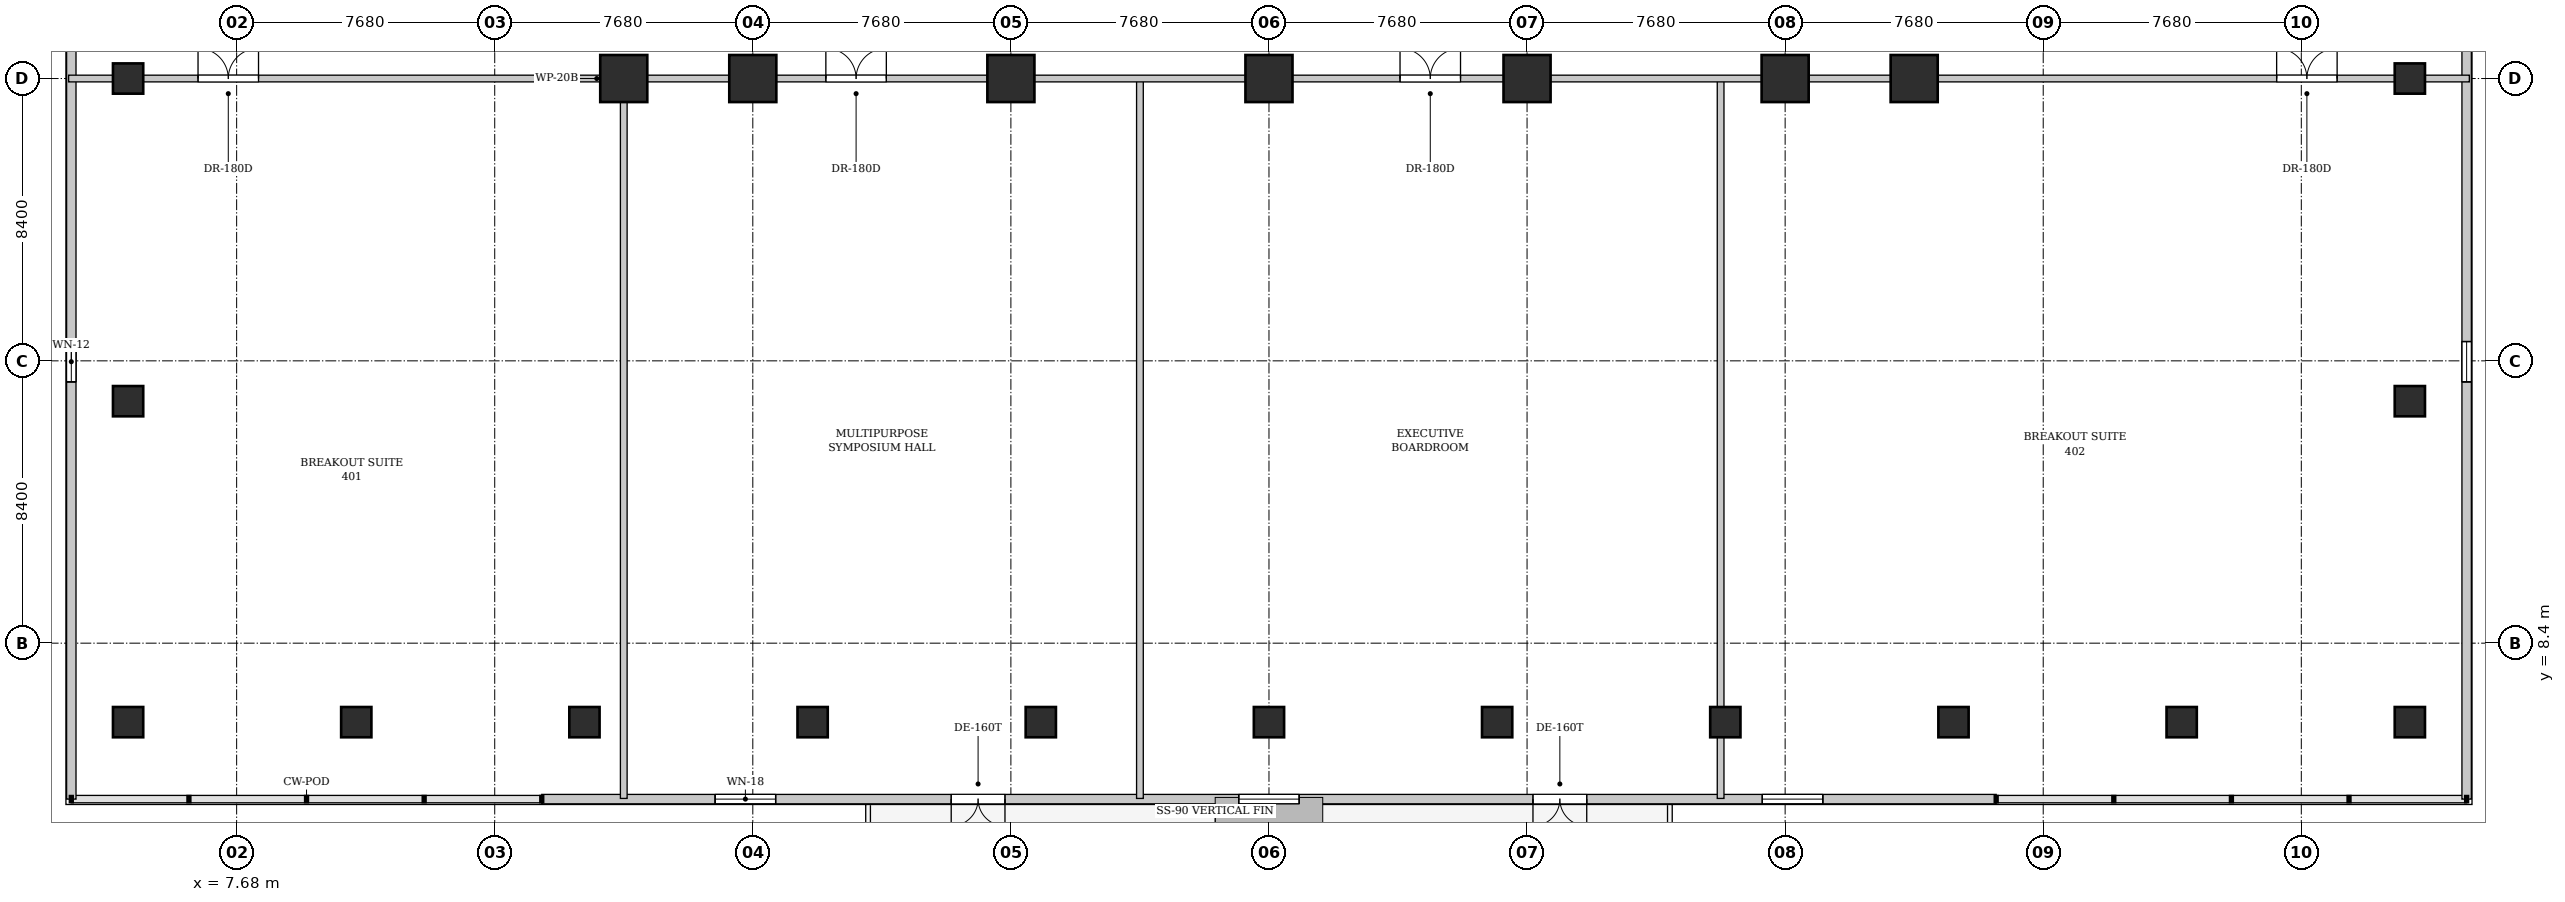
"""IFC4 building model, lengths in metres.
Left out: names, types, materials, properties, quantities, classifications, styles, units other than length and angle.
Written with IfcOpenShell. Run it as: python <this file> out.ifc"""

import sys

from ifc_helpers import new_model, si_unit, direction, frame, frame_2d, origin, origin_2d, place, context, subcontext, project, spatial, rectangle, extrude, element, fill, save


model = new_model("IFC4")
c1 = context("Model", 3, precision=1e-05, world=origin(), true_north=direction((0.0, 1.0)))
c2 = subcontext(c1, "Body", "Model", "MODEL_VIEW")
j1 = project(units=[si_unit("LENGTHUNIT", "METRE"), si_unit("PLANEANGLEUNIT", "RADIAN")], contexts=[c1])
p1 = place(None, origin())
s1 = spatial("IfcSite", under=j1, at=p1, CompositionType="ELEMENT")
p2 = place(p1, origin())
s2 = spatial("IfcBuilding", under=s1, at=p2, CompositionType="ELEMENT")
p3 = place(p2, frame((0.0, 0.0, 20.4)))
s3 = spatial("IfcBuildingStorey", under=s2, at=p3, CompositionType="ELEMENT", Elevation=20.4)
for number, where, z_axis, x_axis in (
    (1, (23.04, 25.2, 0.0), (0.0, 0.0, 1.0), (1.0, 0.0, 0.0)),
    (2, (30.72, 25.2, 0.0), (0.0, 0.0, 1.0), (1.0, 0.0, 0.0)),
    (3, (38.4, 25.2, 0.0), (0.0, 0.0, 1.0), (1.0, 0.0, 0.0)),
    (4, (46.08, 25.2, 0.0), (0.0, 0.0, 1.0), (1.0, 0.0, 0.0)),
    (5, (53.76, 25.2, 0.0), (0.0, 0.0, 1.0), (1.0, 0.0, 0.0)),
    (6, (19.2, 25.2, 0.0), (0.0, 0.0, 1.0), (1.0, 0.0, 0.0)),
    (7, (57.6, 25.2, 0.0), (0.0, 0.0, 1.0), (1.0, 0.0, 0.0)),
):
    element("IfcColumn", number, at=place(p3, frame(where, z_axis=z_axis, x_axis=x_axis)), inside=s3, PredefinedType="COLUMN", context=c2, shape_type="SweptSolid", body=[
        extrude(rectangle(XDim=1.4, YDim=1.4, at=origin_2d()), origin(), (0.0, 0.0, 1.0), 4.8),
    ])
for number, where, z_axis, x_axis in (
    (8, (4.45, 6.05, 0.0), (0.0, 0.0, 1.0), (1.0, 0.0, 0.0)),
    (9, (11.24, 6.05, 0.0), (0.0, 0.0, 1.0), (1.0, 0.0, 0.0)),
    (10, (18.03, 6.05, 0.0), (0.0, 0.0, 1.0), (1.0, 0.0, 0.0)),
    (11, (24.82, 6.05, 0.0), (0.0, 0.0, 1.0), (1.0, 0.0, 0.0)),
    (12, (31.61, 6.05, 0.0), (0.0, 0.0, 1.0), (1.0, 0.0, 0.0)),
    (13, (38.4, 6.05, 0.0), (0.0, 0.0, 1.0), (1.0, 0.0, 0.0)),
    (14, (45.19, 6.05, 0.0), (0.0, 0.0, 1.0), (1.0, 0.0, 0.0)),
    (15, (51.98, 6.05, 0.0), (0.0, 0.0, 1.0), (1.0, 0.0, 0.0)),
    (16, (58.77, 6.05, 0.0), (0.0, 0.0, 1.0), (1.0, 0.0, 0.0)),
    (17, (65.56, 6.05, 0.0), (0.0, 0.0, 1.0), (1.0, 0.0, 0.0)),
    (18, (72.35, 6.05, 0.0), (0.0, 0.0, 1.0), (1.0, 0.0, 0.0)),
    (19, (4.45, 15.6, 0.0), (0.0, 0.0, 1.0), (1.0, 0.0, 0.0)),
    (20, (72.35, 15.6, 0.0), (0.0, 0.0, 1.0), (1.0, 0.0, 0.0)),
    (21, (4.45, 25.2, 0.0), (0.0, 0.0, 1.0), (1.0, 0.0, 0.0)),
    (22, (72.35, 25.2, 0.0), (0.0, 0.0, 1.0), (1.0, 0.0, 0.0)),
):
    element("IfcColumn", number, at=place(p3, frame(where, z_axis=z_axis, x_axis=x_axis)), inside=s3, PredefinedType="COLUMN", context=c2, shape_type="SweptSolid", body=[
        extrude(rectangle(XDim=0.9, YDim=0.9, at=origin_2d()), origin(), (0.0, 0.0, 1.0), 4.8),
    ])
p4 = place(p3, frame((2.76, 3.76, 0.0), z_axis=(0.0, 0.0, 1.0), x_axis=(0.0, 1.0, 0.0)))
e23 = element("IfcWall", 23, at=p4, inside=s3, PredefinedType="SOLIDWALL", context=c2, shape_type="SweptSolid", body=[
    extrude(rectangle(XDim=46.48, YDim=0.28, at=frame_2d((23.24, 0.0))), origin(), (0.0, 0.0, 1.0), 4.38),
])
p5 = place(p4, frame((12.414, 0.0, 1.0)))
e24 = element("IfcOpeningElement", 24, at=p5, cuts=e23, PredefinedType="OPENING", context=c2, shape_type="SweptSolid", body=[
    extrude(rectangle(XDim=1.2, YDim=1.8, at=frame_2d((0.6, 0.9))), frame((0.0, 0.15, 0.0), z_axis=(0.0, -1.0, 0.0), x_axis=(1.0, 0.0, 0.0)), (0.0, 0.0, 1.0), 0.3),
])
p6 = place(p4, frame((32.865, 0.0, 1.0)))
e25 = element("IfcOpeningElement", 25, at=p6, cuts=e23, PredefinedType="OPENING", context=c2, shape_type="SweptSolid", body=[
    extrude(rectangle(XDim=1.2, YDim=1.8, at=frame_2d((0.6, 0.9))), frame((0.0, 0.15, 0.0), z_axis=(0.0, -1.0, 0.0), x_axis=(1.0, 0.0, 0.0)), (0.0, 0.0, 1.0), 0.3),
])
p7 = place(p3, frame((74.04, 50.24, 0.0), z_axis=(0.0, 0.0, 1.0), x_axis=(0.0, -1.0, 0.0)))
e26 = element("IfcWall", 26, at=p7, inside=s3, PredefinedType="SOLIDWALL", context=c2, shape_type="SweptSolid", body=[
    extrude(rectangle(XDim=46.48, YDim=0.28, at=frame_2d((23.24, 0.0))), origin(), (0.0, 0.0, 1.0), 4.38),
])
p8 = place(p7, frame((12.414, 0.0, 1.0)))
e27 = element("IfcOpeningElement", 27, at=p8, cuts=e26, PredefinedType="OPENING", context=c2, shape_type="SweptSolid", body=[
    extrude(rectangle(XDim=1.2, YDim=1.8, at=frame_2d((0.6, 0.9))), frame((0.0, 0.15, 0.0), z_axis=(0.0, -1.0, 0.0), x_axis=(1.0, 0.0, 0.0)), (0.0, 0.0, 1.0), 0.3),
])
p9 = place(p7, frame((32.865, 0.0, 1.0)))
e28 = element("IfcOpeningElement", 28, at=p9, cuts=e26, PredefinedType="OPENING", context=c2, shape_type="SweptSolid", body=[
    extrude(rectangle(XDim=1.2, YDim=1.8, at=frame_2d((0.6, 0.9))), frame((0.0, 0.15, 0.0), z_axis=(0.0, -1.0, 0.0), x_axis=(1.0, 0.0, 0.0)), (0.0, 0.0, 1.0), 0.3),
])
p10 = place(p3, frame((16.76, 3.76, 0.0), z_axis=(0.0, 0.0, 1.0), x_axis=(1.0, 0.0, 0.0)))
e29 = element("IfcWall", 29, at=p10, inside=s3, PredefinedType="SOLIDWALL", context=c2, shape_type="SweptSolid", body=[
    extrude(rectangle(XDim=43.28, YDim=0.28, at=frame_2d((21.64, 0.0))), origin(), (0.0, 0.0, 1.0), 4.38),
])
p11 = place(p10, frame((12.184, 0.0, 0.0)))
e30 = element("IfcOpeningElement", 30, at=p11, cuts=e29, PredefinedType="OPENING", context=c2, shape_type="SweptSolid", body=[
    extrude(rectangle(XDim=1.6, YDim=2.25, at=frame_2d((0.8, 1.125))), frame((0.0, 0.15, 0.0), z_axis=(0.0, -1.0, 0.0), x_axis=(1.0, 0.0, 0.0)), (0.0, 0.0, 1.0), 0.3),
])
p12 = place(p10, frame((29.496, 0.0, 0.0)))
e31 = element("IfcOpeningElement", 31, at=p12, cuts=e29, PredefinedType="OPENING", context=c2, shape_type="SweptSolid", body=[
    extrude(rectangle(XDim=1.6, YDim=2.25, at=frame_2d((0.8, 1.125))), frame((0.0, 0.15, 0.0), z_axis=(0.0, -1.0, 0.0), x_axis=(1.0, 0.0, 0.0)), (0.0, 0.0, 1.0), 0.3),
])
p13 = place(p10, frame((5.159, 0.0, 0.9)))
e32 = element("IfcOpeningElement", 32, at=p13, cuts=e29, PredefinedType="OPENING", context=c2, shape_type="SweptSolid", body=[
    extrude(rectangle(XDim=1.8, YDim=2.0, at=frame_2d((0.9, 1.0))), frame((0.0, 0.15, 0.0), z_axis=(0.0, -1.0, 0.0), x_axis=(1.0, 0.0, 0.0)), (0.0, 0.0, 1.0), 0.3),
])
p14 = place(p10, frame((20.74, 0.0, 0.9)))
e33 = element("IfcOpeningElement", 33, at=p14, cuts=e29, PredefinedType="OPENING", context=c2, shape_type="SweptSolid", body=[
    extrude(rectangle(XDim=1.8, YDim=2.0, at=frame_2d((0.9, 1.0))), frame((0.0, 0.15, 0.0), z_axis=(0.0, -1.0, 0.0), x_axis=(1.0, 0.0, 0.0)), (0.0, 0.0, 1.0), 0.3),
])
p15 = place(p10, frame((36.321, 0.0, 0.9)))
e34 = element("IfcOpeningElement", 34, at=p15, cuts=e29, PredefinedType="OPENING", context=c2, shape_type="SweptSolid", body=[
    extrude(rectangle(XDim=1.8, YDim=2.0, at=frame_2d((0.9, 1.0))), frame((0.0, 0.15, 0.0), z_axis=(0.0, -1.0, 0.0), x_axis=(1.0, 0.0, 0.0)), (0.0, 0.0, 1.0), 0.3),
])
p16 = place(p3, frame((19.2, 3.78, 0.0), z_axis=(0.0, 0.0, 1.0), x_axis=(0.0, 1.0, 0.0)))
e35 = element("IfcWall", 35, at=p16, inside=s3, PredefinedType="PARTITIONING", context=c2, shape_type="SweptSolid", body=[
    extrude(rectangle(XDim=21.42, YDim=0.2, at=frame_2d((10.71, 0.0))), origin(), (0.0, 0.0, 1.0), 3.575),
])
p17 = place(p3, frame((34.56, 3.78, 0.0), z_axis=(0.0, 0.0, 1.0), x_axis=(0.0, 1.0, 0.0)))
e36 = element("IfcWall", 36, at=p17, inside=s3, PredefinedType="PARTITIONING", context=c2, shape_type="SweptSolid", body=[
    extrude(rectangle(XDim=21.42, YDim=0.2, at=frame_2d((10.71, 0.0))), origin(), (0.0, 0.0, 1.0), 4.38),
])
p18 = place(p3, frame((51.84, 3.78, 0.0), z_axis=(0.0, 0.0, 1.0), x_axis=(0.0, 1.0, 0.0)))
e37 = element("IfcWall", 37, at=p18, inside=s3, PredefinedType="PARTITIONING", context=c2, shape_type="SweptSolid", body=[
    extrude(rectangle(XDim=21.42, YDim=0.2, at=frame_2d((10.71, 0.0))), origin(), (0.0, 0.0, 1.0), 3.575),
])
p19 = place(p3, frame((2.68, 25.2, 0.0), z_axis=(0.0, 0.0, 1.0), x_axis=(1.0, 0.0, 0.0)))
e38 = element("IfcWall", 38, at=p19, inside=s3, PredefinedType="PARTITIONING", context=c2, shape_type="SweptSolid", body=[
    extrude(rectangle(XDim=71.44, YDim=0.2, at=frame_2d((35.72, 0.0))), origin(), (0.0, 0.0, 1.0), 3.575),
])
p20 = place(p19, frame((3.851, 0.0, 0.0)))
e39 = element("IfcOpeningElement", 39, at=p20, cuts=e38, PredefinedType="OPENING", context=c2, shape_type="SweptSolid", body=[
    extrude(rectangle(XDim=1.8, YDim=2.3, at=frame_2d((0.9, 1.15))), frame((0.0, 0.11, 0.0), z_axis=(0.0, -1.0, 0.0), x_axis=(1.0, 0.0, 0.0)), (0.0, 0.0, 1.0), 0.22),
])
p21 = place(p19, frame((22.534, 0.0, 0.0)))
e40 = element("IfcOpeningElement", 40, at=p21, cuts=e38, PredefinedType="OPENING", context=c2, shape_type="SweptSolid", body=[
    extrude(rectangle(XDim=1.8, YDim=2.3, at=frame_2d((0.9, 1.15))), frame((0.0, 0.11, 0.0), z_axis=(0.0, -1.0, 0.0), x_axis=(1.0, 0.0, 0.0)), (0.0, 0.0, 1.0), 0.22),
])
p22 = place(p19, frame((39.62, 0.0, 0.0)))
e41 = element("IfcOpeningElement", 41, at=p22, cuts=e38, PredefinedType="OPENING", context=c2, shape_type="SweptSolid", body=[
    extrude(rectangle(XDim=1.8, YDim=2.3, at=frame_2d((0.9, 1.15))), frame((0.0, 0.11, 0.0), z_axis=(0.0, -1.0, 0.0), x_axis=(1.0, 0.0, 0.0)), (0.0, 0.0, 1.0), 0.22),
])
p23 = place(p19, frame((65.706, 0.0, 0.0)))
e42 = element("IfcOpeningElement", 42, at=p23, cuts=e38, PredefinedType="OPENING", context=c2, shape_type="SweptSolid", body=[
    extrude(rectangle(XDim=1.8, YDim=2.3, at=frame_2d((0.9, 1.15))), frame((0.0, 0.11, 0.0), z_axis=(0.0, -1.0, 0.0), x_axis=(1.0, 0.0, 0.0)), (0.0, 0.0, 1.0), 0.22),
])
p24 = place(p5, origin())
e43 = element("IfcWindow", 43, at=p24, inside=s3, PartitioningType="SINGLE_PANEL", PredefinedType="WINDOW", context=c2, shape_type="SweptSolid", body=[
    extrude(rectangle(XDim=1.2, YDim=1.8, at=frame_2d((0.6, 0.9))), frame((0.0, 0.03, 0.0), z_axis=(0.0, -1.0, 0.0), x_axis=(1.0, 0.0, 0.0)), (0.0, 0.0, 1.0), 0.06),
])
fill(e24, e43)
p25 = place(p9, origin())
e44 = element("IfcWindow", 44, at=p25, inside=s3, PartitioningType="SINGLE_PANEL", PredefinedType="WINDOW", context=c2, shape_type="SweptSolid", body=[
    extrude(rectangle(XDim=1.2, YDim=1.8, at=frame_2d((0.6, 0.9))), frame((0.0, 0.03, 0.0), z_axis=(0.0, -1.0, 0.0), x_axis=(1.0, 0.0, 0.0)), (0.0, 0.0, 1.0), 0.06),
])
fill(e28, e44)
p26 = place(p11, frame((1.6, 0.0, 0.0), z_axis=(0.0, 0.0, 1.0), x_axis=(-1.0, 0.0, 0.0)))
e45 = element("IfcDoor", 45, at=p26, inside=s3, OperationType="SINGLE_SWING_LEFT", PredefinedType="DOOR", context=c2, shape_type="SweptSolid", body=[
    extrude(rectangle(XDim=1.6, YDim=2.25, at=frame_2d((0.8, 1.125))), frame((0.0, 0.025, 0.0), z_axis=(0.0, -1.0, 0.0), x_axis=(1.0, 0.0, 0.0)), (0.0, 0.0, 1.0), 0.05),
])
fill(e30, e45)
p27 = place(p12, frame((1.6, 0.0, 0.0), z_axis=(0.0, 0.0, 1.0), x_axis=(-1.0, 0.0, 0.0)))
e46 = element("IfcDoor", 46, at=p27, inside=s3, OperationType="SINGLE_SWING_LEFT", PredefinedType="DOOR", context=c2, shape_type="SweptSolid", body=[
    extrude(rectangle(XDim=1.6, YDim=2.25, at=frame_2d((0.8, 1.125))), frame((0.0, 0.025, 0.0), z_axis=(0.0, -1.0, 0.0), x_axis=(1.0, 0.0, 0.0)), (0.0, 0.0, 1.0), 0.05),
])
fill(e31, e46)
p28 = place(p13, origin())
e47 = element("IfcWindow", 47, at=p28, inside=s3, PartitioningType="SINGLE_PANEL", PredefinedType="WINDOW", context=c2, shape_type="SweptSolid", body=[
    extrude(rectangle(XDim=1.8, YDim=2.0, at=frame_2d((0.9, 1.0))), frame((0.0, 0.03, 0.0), z_axis=(0.0, -1.0, 0.0), x_axis=(1.0, 0.0, 0.0)), (0.0, 0.0, 1.0), 0.06),
])
fill(e32, e47)
p29 = place(p14, origin())
e48 = element("IfcWindow", 48, at=p29, inside=s3, PartitioningType="SINGLE_PANEL", PredefinedType="WINDOW", context=c2, shape_type="SweptSolid", body=[
    extrude(rectangle(XDim=1.8, YDim=2.0, at=frame_2d((0.9, 1.0))), frame((0.0, 0.03, 0.0), z_axis=(0.0, -1.0, 0.0), x_axis=(1.0, 0.0, 0.0)), (0.0, 0.0, 1.0), 0.06),
])
fill(e33, e48)
p30 = place(p15, origin())
e49 = element("IfcWindow", 49, at=p30, inside=s3, PartitioningType="SINGLE_PANEL", PredefinedType="WINDOW", context=c2, shape_type="SweptSolid", body=[
    extrude(rectangle(XDim=1.8, YDim=2.0, at=frame_2d((0.9, 1.0))), frame((0.0, 0.03, 0.0), z_axis=(0.0, -1.0, 0.0), x_axis=(1.0, 0.0, 0.0)), (0.0, 0.0, 1.0), 0.06),
])
fill(e34, e49)
p31 = place(p20, origin())
e50 = element("IfcDoor", 50, at=p31, inside=s3, OperationType="DOUBLE_DOOR_SINGLE_SWING", PredefinedType="DOOR", context=c2, shape_type="SweptSolid", body=[
    extrude(rectangle(XDim=1.8, YDim=2.3, at=frame_2d((0.9, 1.15))), frame((0.0, 0.025, 0.0), z_axis=(0.0, -1.0, 0.0), x_axis=(1.0, 0.0, 0.0)), (0.0, 0.0, 1.0), 0.05),
])
fill(e39, e50)
p32 = place(p21, origin())
e51 = element("IfcDoor", 51, at=p32, inside=s3, OperationType="DOUBLE_DOOR_SINGLE_SWING", PredefinedType="DOOR", context=c2, shape_type="SweptSolid", body=[
    extrude(rectangle(XDim=1.8, YDim=2.3, at=frame_2d((0.9, 1.15))), frame((0.0, 0.025, 0.0), z_axis=(0.0, -1.0, 0.0), x_axis=(1.0, 0.0, 0.0)), (0.0, 0.0, 1.0), 0.05),
])
fill(e40, e51)
p33 = place(p22, origin())
e52 = element("IfcDoor", 52, at=p33, inside=s3, OperationType="DOUBLE_DOOR_SINGLE_SWING", PredefinedType="DOOR", context=c2, shape_type="SweptSolid", body=[
    extrude(rectangle(XDim=1.8, YDim=2.3, at=frame_2d((0.9, 1.15))), frame((0.0, 0.025, 0.0), z_axis=(0.0, -1.0, 0.0), x_axis=(1.0, 0.0, 0.0)), (0.0, 0.0, 1.0), 0.05),
])
fill(e41, e52)
p34 = place(p23, origin())
e53 = element("IfcDoor", 53, at=p34, inside=s3, OperationType="DOUBLE_DOOR_SINGLE_SWING", PredefinedType="DOOR", context=c2, shape_type="SweptSolid", body=[
    extrude(rectangle(XDim=1.8, YDim=2.3, at=frame_2d((0.9, 1.15))), frame((0.0, 0.025, 0.0), z_axis=(0.0, -1.0, 0.0), x_axis=(1.0, 0.0, 0.0)), (0.0, 0.0, 1.0), 0.05),
])
fill(e42, e53)
save(model, sys.argv[1])
